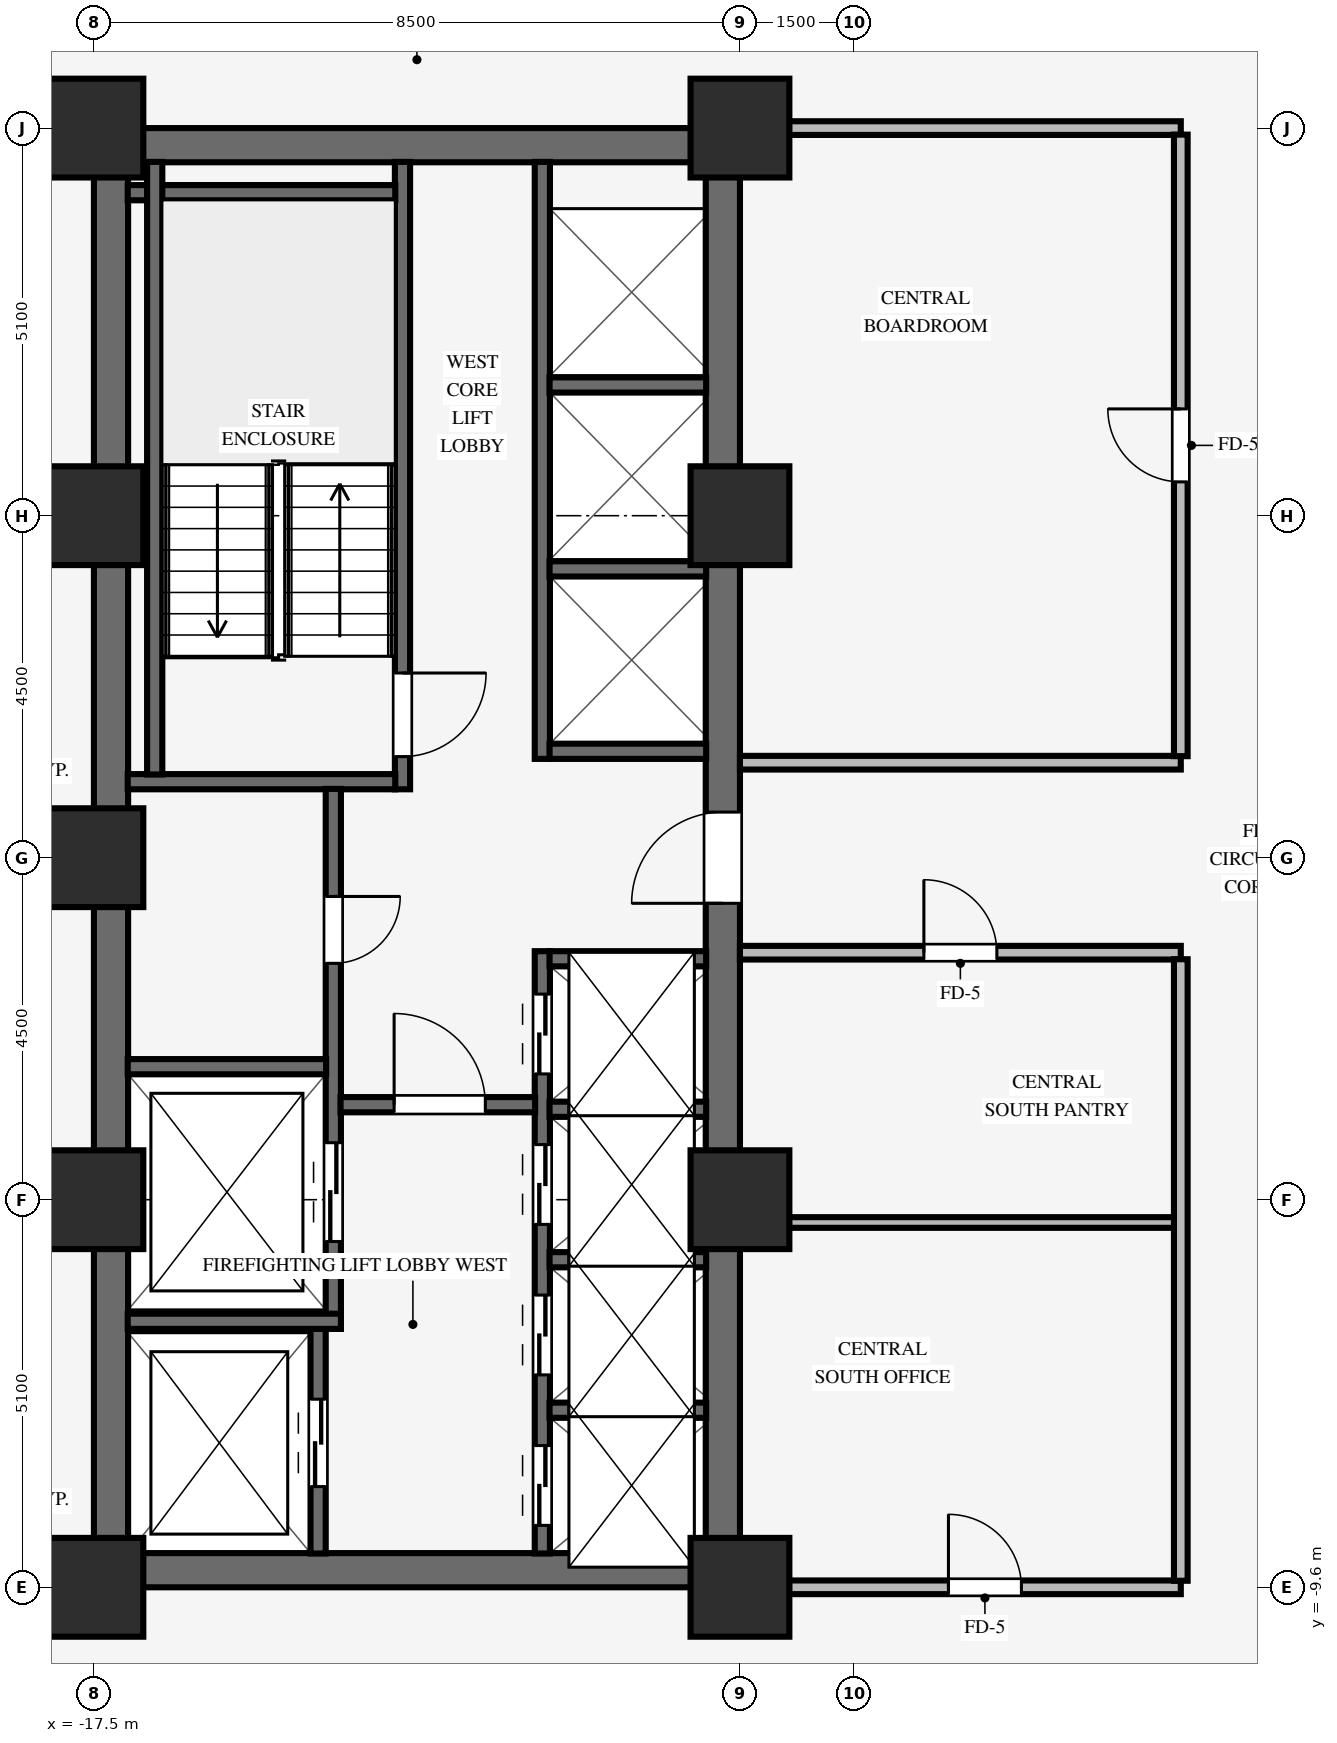
"""IFC4 building model, lengths in metres.
Left out: names, types, materials, properties, quantities, classifications, styles, units other than length and angle.
Written with IfcOpenShell. Run it as: python <this file> out.ifc"""

import sys

from ifc_helpers import new_model, si_unit, direction, frame, frame_2d, origin, origin_2d, place, context, subcontext, project, spatial, rectangle, extrude, source, transform, mapped, element, fill, save


model = new_model("IFC4")
c1 = context("Model", 3, precision=1e-05, world=origin(), true_north=direction((0.0, 1.0)))
c2 = subcontext(c1, "Body", "Model", "MODEL_VIEW")
j1 = project(units=[si_unit("LENGTHUNIT", "METRE"), si_unit("PLANEANGLEUNIT", "RADIAN")], contexts=[c1])
p1 = place(None, origin())
s1 = spatial("IfcSite", under=j1, at=p1, CompositionType="ELEMENT")
p2 = place(p1, origin())
s2 = spatial("IfcBuilding", under=s1, at=p2, CompositionType="ELEMENT")
p3 = place(p2, frame((0.0, 0.0, 49.5)))
s3 = spatial("IfcBuildingStorey", under=s2, at=p3, CompositionType="ELEMENT", Elevation=49.5)
for number, where, z_axis, x_axis in (
    (1, (-17.5, -9.375, 0.0), (0.0, 0.0, 1.0), (1.0, 0.0, 0.0)),
    (2, (-17.5, 9.375, 0.0), (0.0, 0.0, 1.0), (1.0, 0.0, 0.0)),
):
    element("IfcWall", number, at=place(p3, frame(where, z_axis=z_axis, x_axis=x_axis)), inside=s3, PredefinedType="SHEAR", context=c2, shape_type="SweptSolid", body=[
        extrude(rectangle(XDim=8.5, YDim=0.45, at=frame_2d((4.25, 0.0))), origin(), (0.0, 0.0, 1.0), 3.37),
    ])
p4 = place(p3, frame((-17.275, -9.155, 0.0), z_axis=(0.0, 0.0, 1.0), x_axis=(0.0, 1.0, 0.0)))
e3 = element("IfcWall", 3, at=p4, inside=s3, PredefinedType="SHEAR", context=c2, shape_type="SweptSolid", body=[
    extrude(rectangle(XDim=18.31, YDim=0.45, at=frame_2d((9.155, 0.0))), origin(), (0.0, 0.0, 1.0), 3.37),
])
p5 = place(p3, frame((-9.225, -9.155, 0.0), z_axis=(0.0, 0.0, 1.0), x_axis=(0.0, 1.0, 0.0)))
e4 = element("IfcWall", 4, at=p5, inside=s3, PredefinedType="SHEAR", context=c2, shape_type="SweptSolid", body=[
    extrude(rectangle(XDim=18.31, YDim=0.45, at=frame_2d((9.155, 0.0))), origin(), (0.0, 0.0, 1.0), 3.37),
])
p6 = place(p5, frame((8.555, 0.0, 0.0)))
e5 = element("IfcOpeningElement", 5, at=p6, cuts=e4, PredefinedType="OPENING", context=c2, shape_type="SweptSolid", body=[
    extrude(rectangle(XDim=1.2, YDim=2.15, at=frame_2d((0.6, 1.075))), frame((0.0, 0.235, 0.0), z_axis=(0.0, -1.0, 0.0), x_axis=(1.0, 0.0, 0.0)), (0.0, 0.0, 1.0), 0.47),
])
for number, where, z_axis, x_axis in (
    (6, (-17.5, -9.6, 0.0), (0.0, 0.0, 1.0), (1.0, 0.0, 0.0)),
    (7, (-17.5, -4.5, 0.0), (0.0, 0.0, 1.0), (1.0, 0.0, 0.0)),
    (8, (-17.5, 4.5, 0.0), (0.0, 0.0, 1.0), (1.0, 0.0, 0.0)),
    (9, (-17.5, 9.6, 0.0), (0.0, 0.0, 1.0), (1.0, 0.0, 0.0)),
    (10, (-9.0, -9.6, 0.0), (0.0, 0.0, 1.0), (1.0, 0.0, 0.0)),
    (11, (-9.0, -4.5, 0.0), (0.0, 0.0, 1.0), (1.0, 0.0, 0.0)),
    (12, (-9.0, 4.5, 0.0), (0.0, 0.0, 1.0), (1.0, 0.0, 0.0)),
    (13, (-9.0, 9.6, 0.0), (0.0, 0.0, 1.0), (1.0, 0.0, 0.0)),
    (14, (-17.5, 0.0, 0.0), (0.0, 0.0, 1.0), (1.0, 0.0, 0.0)),
):
    element("IfcColumn", number, at=place(p3, frame(where, z_axis=z_axis, x_axis=x_axis)), inside=s3, PredefinedType="COLUMN", context=c2, shape_type="SweptSolid", body=[
        extrude(rectangle(XDim=1.3, YDim=1.3, at=origin_2d()), origin(), (0.0, 0.0, 1.0), 3.37),
    ])
p7 = place(p3, frame((-13.44, 0.9, 0.0), z_axis=(0.0, 0.0, 1.0), x_axis=(0.0, 1.0, 0.0)))
e15 = element("IfcWall", 15, at=p7, inside=s3, PredefinedType="SHEAR", context=c2, shape_type="SweptSolid", body=[
    extrude(rectangle(XDim=8.255, YDim=0.2, at=frame_2d((4.127, 0.0))), origin(), (0.0, 0.0, 1.0), 3.37),
])
p8 = place(p7, frame((1.53, 0.0, 0.0), z_axis=(0.0, 0.0, 1.0), x_axis=(-1.0, 0.0, 0.0)))
e16 = element("IfcOpeningElement", 16, at=p8, cuts=e15, PredefinedType="OPENING", context=c2, shape_type="SweptSolid", body=[
    extrude(rectangle(XDim=1.1, YDim=2.15, at=frame_2d((0.55, 1.075))), frame((0.0, 0.11, 0.0), z_axis=(0.0, -1.0, 0.0), x_axis=(1.0, 0.0, 0.0)), (0.0, 0.0, 1.0), 0.22),
])
for number, where, z_axis, x_axis in (
    (17, (-17.055, 1.0, 0.0), (0.0, 0.0, 1.0), (1.0, 0.0, 0.0)),
    (18, (-17.055, 8.75, 0.0), (0.0, 0.0, 1.0), (1.0, 0.0, 0.0)),
):
    element("IfcWall", number, at=place(p3, frame(where, z_axis=z_axis, x_axis=x_axis)), inside=s3, PredefinedType="SHEAR", context=c2, shape_type="SweptSolid", body=[
        extrude(rectangle(XDim=3.52, YDim=0.2, at=frame_2d((1.76, 0.0))), origin(), (0.0, 0.0, 1.0), 3.37),
    ])
p9 = place(p3, frame((-16.7, 1.095, 0.0), z_axis=(0.0, 0.0, 1.0), x_axis=(0.0, 1.0, 0.0)))
e19 = element("IfcWall", 19, at=p9, inside=s3, PredefinedType="SHEAR", context=c2, shape_type="SweptSolid", body=[
    extrude(rectangle(XDim=8.06, YDim=0.2, at=frame_2d((4.03, 0.0))), origin(), (0.0, 0.0, 1.0), 3.37),
])
p10 = place(p3, frame((-14.55, -9.155, 0.0), z_axis=(0.0, 0.0, 1.0), x_axis=(0.0, 1.0, 0.0)))
e20 = element("IfcWall", 20, at=p10, inside=s3, PredefinedType="SHEAR", context=c2, shape_type="SweptSolid", body=[
    extrude(rectangle(XDim=2.96, YDim=0.2, at=frame_2d((1.48, 0.0))), origin(), (0.0, 0.0, 1.0), 3.37),
])
p11 = place(p10, frame((0.88, 0.0, 0.0)))
e21 = element("IfcOpeningElement", 21, at=p11, cuts=e20, PredefinedType="OPENING", context=c2, shape_type="SweptSolid", body=[
    extrude(rectangle(XDim=1.15, YDim=2.15, at=frame_2d((0.575, 1.075))), frame((0.0, 0.11, 0.0), z_axis=(0.0, -1.0, 0.0), x_axis=(1.0, 0.0, 0.0)), (0.0, 0.0, 1.0), 0.22),
])
p12 = place(p3, frame((-14.35, -6.2, 0.0), z_axis=(0.0, 0.0, 1.0), x_axis=(0.0, 1.0, 0.0)))
e22 = element("IfcWall", 22, at=p12, inside=s3, PredefinedType="SHEAR", context=c2, shape_type="SweptSolid", body=[
    extrude(rectangle(XDim=7.105, YDim=0.2, at=frame_2d((3.552, 0.0))), origin(), (0.0, 0.0, 1.0), 3.37),
])
p13 = place(p12, frame((5.69, 0.0, 0.0), z_axis=(0.0, 0.0, 1.0), x_axis=(-1.0, 0.0, 0.0)))
e23 = element("IfcOpeningElement", 23, at=p13, cuts=e22, PredefinedType="OPENING", context=c2, shape_type="SweptSolid", body=[
    extrude(rectangle(XDim=0.88, YDim=2.1, at=frame_2d((0.44, 1.05))), frame((0.0, 0.11, 0.0), z_axis=(0.0, -1.0, 0.0), x_axis=(1.0, 0.0, 0.0)), (0.0, 0.0, 1.0), 0.22),
])
p14 = place(p12, frame((1.15, 0.0, 0.0)))
e24 = element("IfcOpeningElement", 24, at=p14, cuts=e22, PredefinedType="OPENING", context=c2, shape_type="SweptSolid", body=[
    extrude(rectangle(XDim=1.3, YDim=2.2, at=frame_2d((0.65, 1.1))), frame((0.0, 0.11, 0.0), z_axis=(0.0, -1.0, 0.0), x_axis=(1.0, 0.0, 0.0)), (0.0, 0.0, 1.0), 0.22),
])
p15 = place(p3, frame((-17.055, -6.1, 0.0), z_axis=(0.0, 0.0, 1.0), x_axis=(1.0, 0.0, 0.0)))
e25 = element("IfcWall", 25, at=p15, inside=s3, PredefinedType="SHEAR", context=c2, shape_type="SweptSolid", body=[
    extrude(rectangle(XDim=2.805, YDim=0.2, at=frame_2d((1.402, 0.0))), origin(), (0.0, 0.0, 1.0), 3.37),
])
p16 = place(p3, frame((-17.055, -2.75, 0.0), z_axis=(0.0, 0.0, 1.0), x_axis=(1.0, 0.0, 0.0)))
e26 = element("IfcWall", 26, at=p16, inside=s3, PredefinedType="SHEAR", context=c2, shape_type="SweptSolid", body=[
    extrude(rectangle(XDim=2.61, YDim=0.2, at=frame_2d((1.305, 0.0))), origin(), (0.0, 0.0, 1.0), 3.37),
])
p17 = place(p3, frame((-11.6, -9.155, 0.0), z_axis=(0.0, 0.0, 1.0), x_axis=(0.0, 1.0, 0.0)))
e27 = element("IfcWall", 27, at=p17, inside=s3, PredefinedType="SHEAR", context=c2, shape_type="SweptSolid", body=[
    extrude(rectangle(XDim=7.925, YDim=0.2, at=frame_2d((3.962, 0.0))), origin(), (0.0, 0.0, 1.0), 3.37),
])
p18 = place(p17, frame((0.37, 0.0, 0.0)))
e28 = element("IfcOpeningElement", 28, at=p18, cuts=e27, PredefinedType="OPENING", context=c2, shape_type="SweptSolid", body=[
    extrude(rectangle(XDim=1.05, YDim=2.15, at=frame_2d((0.525, 1.075))), frame((0.0, 0.11, 0.0), z_axis=(0.0, -1.0, 0.0), x_axis=(1.0, 0.0, 0.0)), (0.0, 0.0, 1.0), 0.22),
])
p19 = place(p17, frame((2.35, 0.0, 0.0)))
e29 = element("IfcOpeningElement", 29, at=p19, cuts=e27, PredefinedType="OPENING", context=c2, shape_type="SweptSolid", body=[
    extrude(rectangle(XDim=1.05, YDim=2.15, at=frame_2d((0.525, 1.075))), frame((0.0, 0.11, 0.0), z_axis=(0.0, -1.0, 0.0), x_axis=(1.0, 0.0, 0.0)), (0.0, 0.0, 1.0), 0.22),
])
p20 = place(p17, frame((4.33, 0.0, 0.0)))
e30 = element("IfcOpeningElement", 30, at=p20, cuts=e27, PredefinedType="OPENING", context=c2, shape_type="SweptSolid", body=[
    extrude(rectangle(XDim=1.05, YDim=2.15, at=frame_2d((0.525, 1.075))), frame((0.0, 0.11, 0.0), z_axis=(0.0, -1.0, 0.0), x_axis=(1.0, 0.0, 0.0)), (0.0, 0.0, 1.0), 0.22),
])
p21 = place(p17, frame((6.31, 0.0, 0.0)))
e31 = element("IfcOpeningElement", 31, at=p21, cuts=e27, PredefinedType="OPENING", context=c2, shape_type="SweptSolid", body=[
    extrude(rectangle(XDim=1.05, YDim=2.15, at=frame_2d((0.525, 1.075))), frame((0.0, 0.11, 0.0), z_axis=(0.0, -1.0, 0.0), x_axis=(1.0, 0.0, 0.0)), (0.0, 0.0, 1.0), 0.22),
])
p22 = place(p3, frame((-14.255, -3.25, 0.0), z_axis=(0.0, 0.0, 1.0), x_axis=(1.0, 0.0, 0.0)))
e32 = element("IfcWall", 32, at=p22, inside=s3, PredefinedType="SHEAR", context=c2, shape_type="SweptSolid", body=[
    extrude(rectangle(XDim=2.56, YDim=0.2, at=frame_2d((1.28, 0.0))), origin(), (0.0, 0.0, 1.0), 3.37),
])
p23 = place(p22, frame((0.705, 0.0, 0.0)))
e33 = element("IfcOpeningElement", 33, at=p23, cuts=e32, PredefinedType="OPENING", context=c2, shape_type="SweptSolid", body=[
    extrude(rectangle(XDim=1.2, YDim=2.15, at=frame_2d((0.6, 1.075))), frame((0.0, 0.11, 0.0), z_axis=(0.0, -1.0, 0.0), x_axis=(1.0, 0.0, 0.0)), (0.0, 0.0, 1.0), 0.22),
])
for number, where, z_axis, x_axis in (
    (34, (-11.505, -7.27, 0.0), (0.0, 0.0, 1.0), (1.0, 0.0, 0.0)),
    (35, (-11.505, -5.29, 0.0), (0.0, 0.0, 1.0), (1.0, 0.0, 0.0)),
    (36, (-11.505, -3.31, 0.0), (0.0, 0.0, 1.0), (1.0, 0.0, 0.0)),
    (37, (-11.505, -1.33, 0.0), (0.0, 0.0, 1.0), (1.0, 0.0, 0.0)),
):
    element("IfcWall", number, at=place(p3, frame(where, z_axis=z_axis, x_axis=x_axis)), inside=s3, PredefinedType="SHEAR", context=c2, shape_type="SweptSolid", body=[
        extrude(rectangle(XDim=2.06, YDim=0.2, at=frame_2d((1.03, 0.0))), origin(), (0.0, 0.0, 1.0), 3.37),
    ])
p24 = place(p3, frame((-11.6, 1.3, 0.0), z_axis=(0.0, 0.0, 1.0), x_axis=(0.0, 1.0, 0.0)))
e38 = element("IfcWall", 38, at=p24, inside=s3, PredefinedType="SHEAR", context=c2, shape_type="SweptSolid", body=[
    extrude(rectangle(XDim=7.855, YDim=0.2, at=frame_2d((3.927, 0.0))), origin(), (0.0, 0.0, 1.0), 3.37),
])
for number, where, z_axis, x_axis in (
    (39, (-11.505, 1.4, 0.0), (0.0, 0.0, 1.0), (1.0, 0.0, 0.0)),
    (40, (-11.505, 3.8, 0.0), (0.0, 0.0, 1.0), (1.0, 0.0, 0.0)),
    (41, (-11.505, 6.22, 0.0), (0.0, 0.0, 1.0), (1.0, 0.0, 0.0)),
):
    element("IfcWall", number, at=place(p3, frame(where, z_axis=z_axis, x_axis=x_axis)), inside=s3, PredefinedType="SHEAR", context=c2, shape_type="SweptSolid", body=[
        extrude(rectangle(XDim=2.06, YDim=0.2, at=frame_2d((1.03, 0.0))), origin(), (0.0, 0.0, 1.0), 3.37),
    ])
p25 = place(p3, frame((-8.354, -9.6, 0.0), z_axis=(0.0, 0.0, 1.0), x_axis=(1.0, 0.0, 0.0)))
e42 = element("IfcWall", 42, at=p25, inside=s3, PredefinedType="PARTITIONING", context=c2, shape_type="SweptSolid", body=[
    extrude(rectangle(XDim=5.154, YDim=0.18, at=frame_2d((2.577, 0.0))), origin(), (0.0, 0.0, 1.0), 2.405),
])
p26 = place(p25, frame((2.097, 0.0, 0.0)))
e43 = element("IfcOpeningElement", 43, at=p26, cuts=e42, PredefinedType="OPENING", context=c2, shape_type="SweptSolid", body=[
    extrude(rectangle(XDim=0.96, YDim=2.1, at=frame_2d((0.48, 1.05))), frame((0.0, 0.1, 0.0), z_axis=(0.0, -1.0, 0.0), x_axis=(1.0, 0.0, 0.0)), (0.0, 0.0, 1.0), 0.2),
])
p27 = place(p3, frame((-8.354, -4.8, 0.0), z_axis=(0.0, 0.0, 1.0), x_axis=(1.0, 0.0, 0.0)))
e44 = element("IfcWall", 44, at=p27, inside=s3, PredefinedType="PARTITIONING", context=c2, shape_type="SweptSolid", body=[
    extrude(rectangle(XDim=5.068, YDim=0.14, at=frame_2d((2.534, 0.0))), origin(), (0.0, 0.0, 1.0), 2.738),
])
p28 = place(p3, frame((-9.0, -1.25, 0.0), z_axis=(0.0, 0.0, 1.0), x_axis=(1.0, 0.0, 0.0)))
e45 = element("IfcWall", 45, at=p28, inside=s3, PredefinedType="PARTITIONING", context=c2, shape_type="SweptSolid", body=[
    extrude(rectangle(XDim=5.8, YDim=0.18, at=frame_2d((2.9, 0.0))), origin(), (0.0, 0.0, 1.0), 3.36),
])
p29 = place(p28, frame((2.42, 0.0, 0.0)))
e46 = element("IfcOpeningElement", 46, at=p29, cuts=e45, PredefinedType="OPENING", context=c2, shape_type="SweptSolid", body=[
    extrude(rectangle(XDim=0.96, YDim=2.1, at=frame_2d((0.48, 1.05))), frame((0.0, 0.1, 0.0), z_axis=(0.0, -1.0, 0.0), x_axis=(1.0, 0.0, 0.0)), (0.0, 0.0, 1.0), 0.2),
])
p30 = place(p3, frame((-9.0, 1.25, 0.0), z_axis=(0.0, 0.0, 1.0), x_axis=(1.0, 0.0, 0.0)))
e47 = element("IfcWall", 47, at=p30, inside=s3, PredefinedType="PARTITIONING", context=c2, shape_type="SweptSolid", body=[
    extrude(rectangle(XDim=5.8, YDim=0.18, at=frame_2d((2.9, 0.0))), origin(), (0.0, 0.0, 1.0), 3.36),
])
p31 = place(p3, frame((-8.354, 9.6, 0.0), z_axis=(0.0, 0.0, 1.0), x_axis=(1.0, 0.0, 0.0)))
e48 = element("IfcWall", 48, at=p31, inside=s3, PredefinedType="PARTITIONING", context=c2, shape_type="SweptSolid", body=[
    extrude(rectangle(XDim=5.154, YDim=0.18, at=frame_2d((2.577, 0.0))), origin(), (0.0, 0.0, 1.0), 2.405),
])
p32 = place(p3, frame((-3.2, -9.514, 0.0), z_axis=(0.0, 0.0, 1.0), x_axis=(0.0, 1.0, 0.0)))
e49 = element("IfcWall", 49, at=p32, inside=s3, PredefinedType="PARTITIONING", context=c2, shape_type="SweptSolid", body=[
    extrude(rectangle(XDim=8.178, YDim=0.18, at=frame_2d((4.089, 0.0))), origin(), (0.0, 0.0, 1.0), 3.36),
])
p33 = place(p3, frame((-3.2, 1.336, 0.0), z_axis=(0.0, 0.0, 1.0), x_axis=(0.0, 1.0, 0.0)))
e50 = element("IfcWall", 50, at=p33, inside=s3, PredefinedType="PARTITIONING", context=c2, shape_type="SweptSolid", body=[
    extrude(rectangle(XDim=8.178, YDim=0.18, at=frame_2d((4.089, 0.0))), origin(), (0.0, 0.0, 1.0), 3.36),
])
p34 = place(p33, frame((3.609, 0.0, 0.0)))
e51 = element("IfcOpeningElement", 51, at=p34, cuts=e50, PredefinedType="OPENING", context=c2, shape_type="SweptSolid", body=[
    extrude(rectangle(XDim=0.96, YDim=2.1, at=frame_2d((0.48, 1.05))), frame((0.0, 0.1, 0.0), z_axis=(0.0, -1.0, 0.0), x_axis=(1.0, 0.0, 0.0)), (0.0, 0.0, 1.0), 0.2),
])
m1 = source(origin(), c2, "Body", "SweptSolid", [
    extrude(rectangle(XDim=1.1, YDim=2.15, at=frame_2d((0.55, 1.075))), frame((0.0, 0.025, 0.0), z_axis=(0.0, -1.0, 0.0), x_axis=(1.0, 0.0, 0.0)), (0.0, 0.0, 1.0), 0.05),
])
p35 = place(p8, origin())
e52 = element("IfcDoor", 52, at=p35, inside=s3, OperationType="SINGLE_SWING_LEFT", PredefinedType="DOOR", context=c2, shape_type="MappedRepresentation", body=[
    mapped(m1, transform((0.0, 0.0, 0.0), scale=1.0)),
])
fill(e16, e52)
m2 = source(origin(), c2, "Body", "SweptSolid", [
    extrude(rectangle(XDim=0.88, YDim=2.1, at=frame_2d((0.44, 1.05))), frame((0.0, 0.025, 0.0), z_axis=(0.0, -1.0, 0.0), x_axis=(1.0, 0.0, 0.0)), (0.0, 0.0, 1.0), 0.05),
])
p36 = place(p13, origin())
e53 = element("IfcDoor", 53, at=p36, inside=s3, OperationType="SINGLE_SWING_LEFT", PredefinedType="DOOR", context=c2, shape_type="MappedRepresentation", body=[
    mapped(m2, transform((0.0, 0.0, 0.0), scale=1.0)),
])
fill(e23, e53)
m3 = source(origin(), c2, "Body", "SweptSolid", [
    extrude(rectangle(XDim=1.2, YDim=2.15, at=frame_2d((0.6, 1.075))), frame((0.0, 0.025, 0.0), z_axis=(0.0, -1.0, 0.0), x_axis=(1.0, 0.0, 0.0)), (0.0, 0.0, 1.0), 0.05),
])
p37 = place(p23, origin())
e54 = element("IfcDoor", 54, at=p37, inside=s3, OperationType="SINGLE_SWING_LEFT", PredefinedType="DOOR", context=c2, shape_type="MappedRepresentation", body=[
    mapped(m3, transform((0.0, 0.0, 0.0), scale=1.0)),
])
fill(e33, e54)
p38 = place(p6, origin())
e55 = element("IfcDoor", 55, at=p38, inside=s3, OperationType="SINGLE_SWING_LEFT", PredefinedType="DOOR", context=c2, shape_type="MappedRepresentation", body=[
    mapped(m3, transform((0.0, 0.0, 0.0), scale=1.0)),
])
fill(e5, e55)
m4 = source(origin(), c2, "Body", "SweptSolid", [
    extrude(rectangle(XDim=1.15, YDim=2.15, at=frame_2d((0.575, 1.075))), frame((0.0, 0.025, 0.0), z_axis=(0.0, -1.0, 0.0), x_axis=(1.0, 0.0, 0.0)), (0.0, 0.0, 1.0), 0.05),
])
p39 = place(p11, origin())
e56 = element("IfcDoor", 56, at=p39, inside=s3, OperationType="DOUBLE_DOOR_SLIDING", PredefinedType="DOOR", context=c2, shape_type="MappedRepresentation", body=[
    mapped(m4, transform((0.0, 0.0, 0.0), scale=1.0)),
])
fill(e21, e56)
m5 = source(origin(), c2, "Body", "SweptSolid", [
    extrude(rectangle(XDim=1.3, YDim=2.2, at=frame_2d((0.65, 1.1))), frame((0.0, 0.025, 0.0), z_axis=(0.0, -1.0, 0.0), x_axis=(1.0, 0.0, 0.0)), (0.0, 0.0, 1.0), 0.05),
])
p40 = place(p14, origin())
e57 = element("IfcDoor", 57, at=p40, inside=s3, OperationType="DOUBLE_DOOR_SLIDING", PredefinedType="DOOR", context=c2, shape_type="MappedRepresentation", body=[
    mapped(m5, transform((0.0, 0.0, 0.0), scale=1.0)),
])
fill(e24, e57)
m6 = source(origin(), c2, "Body", "SweptSolid", [
    extrude(rectangle(XDim=1.05, YDim=2.15, at=frame_2d((0.525, 1.075))), frame((0.0, 0.025, 0.0), z_axis=(0.0, -1.0, 0.0), x_axis=(1.0, 0.0, 0.0)), (0.0, 0.0, 1.0), 0.05),
])
p41 = place(p18, origin())
e58 = element("IfcDoor", 58, at=p41, inside=s3, OperationType="DOUBLE_DOOR_SLIDING", PredefinedType="DOOR", context=c2, shape_type="MappedRepresentation", body=[
    mapped(m6, transform((0.0, 0.0, 0.0), scale=1.0)),
])
fill(e28, e58)
p42 = place(p19, origin())
e59 = element("IfcDoor", 59, at=p42, inside=s3, OperationType="DOUBLE_DOOR_SLIDING", PredefinedType="DOOR", context=c2, shape_type="MappedRepresentation", body=[
    mapped(m6, transform((0.0, 0.0, 0.0), scale=1.0)),
])
fill(e29, e59)
p43 = place(p20, origin())
e60 = element("IfcDoor", 60, at=p43, inside=s3, OperationType="DOUBLE_DOOR_SLIDING", PredefinedType="DOOR", context=c2, shape_type="MappedRepresentation", body=[
    mapped(m6, transform((0.0, 0.0, 0.0), scale=1.0)),
])
fill(e30, e60)
p44 = place(p21, origin())
e61 = element("IfcDoor", 61, at=p44, inside=s3, OperationType="DOUBLE_DOOR_SLIDING", PredefinedType="DOOR", context=c2, shape_type="MappedRepresentation", body=[
    mapped(m6, transform((0.0, 0.0, 0.0), scale=1.0)),
])
fill(e31, e61)
m7 = source(origin(), c2, "Body", "SweptSolid", [
    extrude(rectangle(XDim=0.96, YDim=2.1, at=frame_2d((0.48, 1.05))), frame((0.0, 0.025, 0.0), z_axis=(0.0, -1.0, 0.0), x_axis=(1.0, 0.0, 0.0)), (0.0, 0.0, 1.0), 0.05),
])
p45 = place(p34, origin())
e62 = element("IfcDoor", 62, at=p45, inside=s3, OperationType="SINGLE_SWING_RIGHT", PredefinedType="DOOR", context=c2, shape_type="MappedRepresentation", body=[
    mapped(m7, transform((0.0, 0.0, 0.0), scale=1.0)),
])
fill(e51, e62)
p46 = place(p29, origin())
e63 = element("IfcDoor", 63, at=p46, inside=s3, OperationType="SINGLE_SWING_LEFT", PredefinedType="DOOR", context=c2, shape_type="MappedRepresentation", body=[
    mapped(m7, transform((0.0, 0.0, 0.0), scale=1.0)),
])
fill(e46, e63)
p47 = place(p26, origin())
e64 = element("IfcDoor", 64, at=p47, inside=s3, OperationType="SINGLE_SWING_LEFT", PredefinedType="DOOR", context=c2, shape_type="MappedRepresentation", body=[
    mapped(m7, transform((0.0, 0.0, 0.0), scale=1.0)),
])
fill(e43, e64)
save(model, sys.argv[1])
